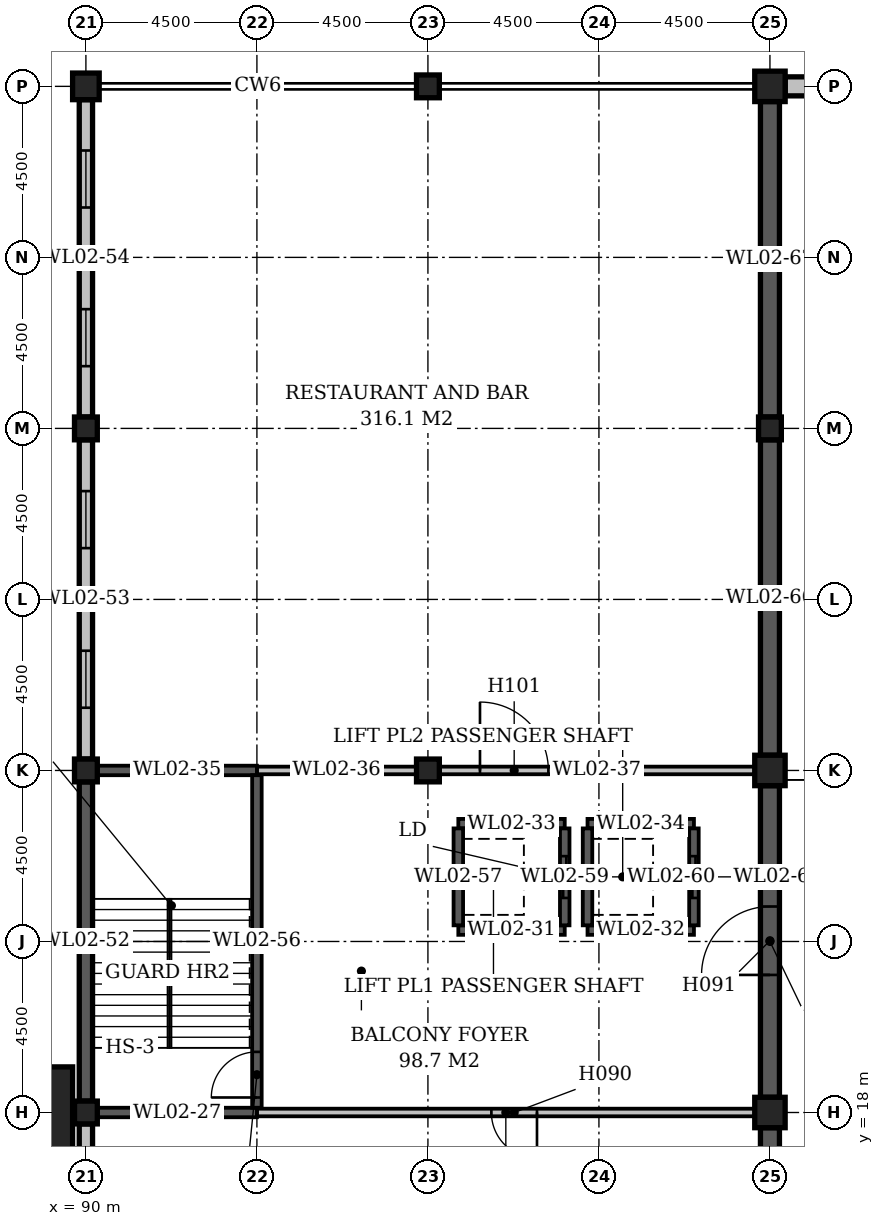
"""IFC4 building model, lengths in metres.
Left out: names, types, materials, properties, quantities, classifications, styles, units other than length and angle.
Written with IfcOpenShell. Run it as: python <this file> out.ifc"""

import sys

from ifc_helpers import new_model, si_unit, direction, frame, frame_2d, origin, origin_2d, place, context, subcontext, project, spatial, rectangle, extrude, element, fill, save


model = new_model("IFC4")
c1 = context("Model", 3, precision=1e-05, world=origin(), true_north=direction((0.0, 1.0)))
c2 = subcontext(c1, "Body", "Model", "MODEL_VIEW")
j1 = project(units=[si_unit("LENGTHUNIT", "METRE"), si_unit("PLANEANGLEUNIT", "RADIAN")], contexts=[c1])
p1 = place(None, origin())
s1 = spatial("IfcSite", under=j1, at=p1, CompositionType="ELEMENT")
p2 = place(p1, origin())
s2 = spatial("IfcBuilding", under=s1, at=p2, CompositionType="ELEMENT")
p3 = place(p2, frame((0.0, 0.0, 14.0)))
s3 = spatial("IfcBuildingStorey", under=s2, at=p3, CompositionType="ELEMENT", Elevation=14.0)
for number, where, z_axis, x_axis in (
    (1, (90.0, 18.0, 0.0), (0.0, 0.0, 1.0), (1.0, 0.0, 0.0)),
    (2, (90.0, 27.0, 0.0), (0.0, 0.0, 1.0), (1.0, 0.0, 0.0)),
    (3, (90.0, 36.0, 0.0), (0.0, 0.0, 1.0), (1.0, 0.0, 0.0)),
):
    element("IfcColumn", number, at=place(p3, frame(where, z_axis=z_axis, x_axis=x_axis)), inside=s3, PredefinedType="COLUMN", context=c2, shape_type="SweptSolid", body=[
        extrude(rectangle(XDim=0.6, YDim=0.6, at=origin_2d()), origin(), (0.0, 0.0, 1.0), 4.7),
    ])
p4 = place(p3, frame((90.0, 45.0, 0.0), z_axis=(0.0, 0.0, 1.0), x_axis=(1.0, 0.0, 0.0)))
e4 = element("IfcColumn", 4, at=p4, inside=s3, PredefinedType="COLUMN", context=c2, shape_type="SweptSolid", body=[
    extrude(rectangle(XDim=0.7, YDim=0.7, at=origin_2d()), origin(), (0.0, 0.0, 1.0), 4.7),
])
for number, where, z_axis, x_axis in (
    (5, (99.0, 27.0, 0.0), (0.0, 0.0, 1.0), (1.0, 0.0, 0.0)),
    (6, (99.0, 45.0, 0.0), (0.0, 0.0, 1.0), (1.0, 0.0, 0.0)),
):
    element("IfcColumn", number, at=place(p3, frame(where, z_axis=z_axis, x_axis=x_axis)), inside=s3, PredefinedType="COLUMN", context=c2, shape_type="SweptSolid", body=[
        extrude(rectangle(XDim=0.6, YDim=0.6, at=origin_2d()), origin(), (0.0, 0.0, 1.0), 4.7),
    ])
for number, where, z_axis, x_axis in (
    (7, (108.0, 18.0, -0.3), (0.0, 0.0, 1.0), (1.0, 0.0, 0.0)),
    (8, (108.0, 27.0, -0.3), (0.0, 0.0, 1.0), (1.0, 0.0, 0.0)),
):
    element("IfcColumn", number, at=place(p3, frame(where, z_axis=z_axis, x_axis=x_axis)), inside=s3, PredefinedType="COLUMN", context=c2, shape_type="SweptSolid", body=[
        extrude(rectangle(XDim=0.8, YDim=0.8, at=origin_2d()), origin(), (0.0, 0.0, 1.0), 5.0),
    ])
p5 = place(p3, frame((108.0, 36.0, -0.3), z_axis=(0.0, 0.0, 1.0), x_axis=(1.0, 0.0, 0.0)))
e9 = element("IfcColumn", 9, at=p5, inside=s3, PredefinedType="COLUMN", context=c2, shape_type="SweptSolid", body=[
    extrude(rectangle(XDim=0.6, YDim=0.6, at=origin_2d()), origin(), (0.0, 0.0, 1.0), 5.0),
])
p6 = place(p3, frame((108.0, 45.0, -0.3), z_axis=(0.0, 0.0, 1.0), x_axis=(1.0, 0.0, 0.0)))
e10 = element("IfcColumn", 10, at=p6, inside=s3, PredefinedType="COLUMN", context=c2, shape_type="SweptSolid", body=[
    extrude(rectangle(XDim=0.8, YDim=0.8, at=origin_2d()), origin(), (0.0, 0.0, 1.0), 5.0),
])
p7 = place(p3, frame((90.3, 18.0, 0.0), z_axis=(0.0, 0.0, 1.0), x_axis=(1.0, 0.0, 0.0)))
e11 = element("IfcWall", 11, at=p7, inside=s3, PredefinedType="STANDARD", context=c2, shape_type="SweptSolid", body=[
    extrude(rectangle(XDim=4.2, YDim=0.25, at=frame_2d((2.1, 0.0))), origin(), (0.0, 0.0, 1.0), 5.0),
])
p8 = place(p3, frame((94.5, 18.0, 0.0), z_axis=(0.0, 0.0, 1.0), x_axis=(1.0, 0.0, 0.0)))
e12 = element("IfcWall", 12, at=p8, inside=s3, PredefinedType="STANDARD", context=c2, shape_type="SweptSolid", body=[
    extrude(rectangle(XDim=13.1, YDim=0.2, at=frame_2d((6.55, 0.0))), origin(), (0.0, 0.0, 1.0), 3.3),
])
p9 = place(p8, frame((6.17, 0.0, 0.0)))
e13 = element("IfcOpeningElement", 13, at=p9, cuts=e12, PredefinedType="OPENING", context=c2, shape_type="SweptSolid", body=[
    extrude(rectangle(XDim=1.2, YDim=2.1, at=frame_2d((0.6, 1.05))), frame((0.0, 0.112, 0.0), z_axis=(0.0, -1.0, 0.0), x_axis=(1.0, 0.0, 0.0)), (0.0, 0.0, 1.0), 0.224),
])
for number, where, z_axis, x_axis in (
    (14, (99.8, 22.8, 0.0), (0.0, 0.0, 1.0), (1.0, 0.0, 0.0)),
    (15, (103.2, 22.8, 0.0), (0.0, 0.0, 1.0), (1.0, 0.0, 0.0)),
    (16, (99.8, 25.6, 0.0), (0.0, 0.0, 1.0), (1.0, 0.0, 0.0)),
    (17, (103.2, 25.6, 0.0), (0.0, 0.0, 1.0), (1.0, 0.0, 0.0)),
):
    element("IfcWall", number, at=place(p3, frame(where, z_axis=z_axis, x_axis=x_axis)), inside=s3, PredefinedType="STANDARD", context=c2, shape_type="SweptSolid", body=[
        extrude(rectangle(XDim=2.8, YDim=0.25, at=frame_2d((1.4, 0.0))), origin(), (0.0, 0.0, 1.0), 5.0),
    ])
p10 = place(p3, frame((90.3, 27.0, 0.0), z_axis=(0.0, 0.0, 1.0), x_axis=(1.0, 0.0, 0.0)))
e18 = element("IfcWall", 18, at=p10, inside=s3, PredefinedType="STANDARD", context=c2, shape_type="SweptSolid", body=[
    extrude(rectangle(XDim=4.2, YDim=0.25, at=frame_2d((2.1, 0.0))), origin(), (0.0, 0.0, 1.0), 5.0),
])
p11 = place(p3, frame((94.5, 27.0, 0.0), z_axis=(0.0, 0.0, 1.0), x_axis=(1.0, 0.0, 0.0)))
e19 = element("IfcWall", 19, at=p11, inside=s3, PredefinedType="STANDARD", context=c2, shape_type="SweptSolid", body=[
    extrude(rectangle(XDim=4.2, YDim=0.2, at=frame_2d((2.1, 0.0))), origin(), (0.0, 0.0, 1.0), 4.7),
])
p12 = place(p3, frame((99.3, 27.0, 0.0), z_axis=(0.0, 0.0, 1.0), x_axis=(1.0, 0.0, 0.0)))
e20 = element("IfcWall", 20, at=p12, inside=s3, PredefinedType="STANDARD", context=c2, shape_type="SweptSolid", body=[
    extrude(rectangle(XDim=8.3, YDim=0.2, at=frame_2d((4.15, 0.0))), origin(), (0.0, 0.0, 1.0), 4.7),
])
p13 = place(p12, frame((1.07, 0.0, 0.0)))
e21 = element("IfcOpeningElement", 21, at=p13, cuts=e20, PredefinedType="OPENING", context=c2, shape_type="SweptSolid", body=[
    extrude(rectangle(XDim=1.8, YDim=2.4, at=frame_2d((0.9, 1.2))), frame((0.0, 0.112, 0.0), z_axis=(0.0, -1.0, 0.0), x_axis=(1.0, 0.0, 0.0)), (0.0, 0.0, 1.0), 0.224),
])
p14 = place(p3, frame((108.4, 45.0, 0.0), z_axis=(0.0, 0.0, 1.0), x_axis=(1.0, 0.0, 0.0)))
e22 = element("IfcWall", 22, at=p14, inside=s3, PredefinedType="STANDARD", context=c2, shape_type="SweptSolid", body=[
    extrude(rectangle(XDim=8.3, YDim=0.5, at=frame_2d((4.15, 0.0))), origin(), (0.0, 0.0, 1.0), 5.0),
])
p15 = place(p3, frame((90.0, 9.3, 0.0), z_axis=(0.0, 0.0, 1.0), x_axis=(0.0, 1.0, 0.0)))
e23 = element("IfcWall", 23, at=p15, inside=s3, PredefinedType="STANDARD", context=c2, shape_type="SweptSolid", body=[
    extrude(rectangle(XDim=8.4, YDim=0.35, at=frame_2d((4.2, 0.0))), origin(), (0.0, 0.0, 1.0), 4.1),
])
p16 = place(p15, frame((1.35, 0.0, 1.0)))
e24 = element("IfcOpeningElement", 24, at=p16, cuts=e23, PredefinedType="OPENING", context=c2, shape_type="SweptSolid", body=[
    extrude(rectangle(XDim=1.5, YDim=2.4, at=frame_2d((0.75, 1.2))), frame((0.0, 0.187, 0.0), z_axis=(0.0, -1.0, 0.0), x_axis=(1.0, 0.0, 0.0)), (0.0, 0.0, 1.0), 0.374),
])
p17 = place(p15, frame((5.55, 0.0, 1.0)))
e25 = element("IfcOpeningElement", 25, at=p17, cuts=e23, PredefinedType="OPENING", context=c2, shape_type="SweptSolid", body=[
    extrude(rectangle(XDim=1.5, YDim=2.4, at=frame_2d((0.75, 1.2))), frame((0.0, 0.187, 0.0), z_axis=(0.0, -1.0, 0.0), x_axis=(1.0, 0.0, 0.0)), (0.0, 0.0, 1.0), 0.374),
])
p18 = place(p3, frame((90.0, 18.3, 0.0), z_axis=(0.0, 0.0, 1.0), x_axis=(0.0, 1.0, 0.0)))
e26 = element("IfcWall", 26, at=p18, inside=s3, PredefinedType="STANDARD", context=c2, shape_type="SweptSolid", body=[
    extrude(rectangle(XDim=8.4, YDim=0.35, at=frame_2d((4.2, 0.0))), origin(), (0.0, 0.0, 1.0), 5.0),
])
p19 = place(p3, frame((90.0, 27.3, 0.0), z_axis=(0.0, 0.0, 1.0), x_axis=(0.0, 1.0, 0.0)))
e27 = element("IfcWall", 27, at=p19, inside=s3, PredefinedType="STANDARD", context=c2, shape_type="SweptSolid", body=[
    extrude(rectangle(XDim=8.4, YDim=0.35, at=frame_2d((4.2, 0.0))), origin(), (0.0, 0.0, 1.0), 4.1),
])
p20 = place(p19, frame((1.35, 0.0, 1.0)))
e28 = element("IfcOpeningElement", 28, at=p20, cuts=e27, PredefinedType="OPENING", context=c2, shape_type="SweptSolid", body=[
    extrude(rectangle(XDim=1.5, YDim=2.4, at=frame_2d((0.75, 1.2))), frame((0.0, 0.187, 0.0), z_axis=(0.0, -1.0, 0.0), x_axis=(1.0, 0.0, 0.0)), (0.0, 0.0, 1.0), 0.374),
])
p21 = place(p19, frame((5.55, 0.0, 1.0)))
e29 = element("IfcOpeningElement", 29, at=p21, cuts=e27, PredefinedType="OPENING", context=c2, shape_type="SweptSolid", body=[
    extrude(rectangle(XDim=1.5, YDim=2.4, at=frame_2d((0.75, 1.2))), frame((0.0, 0.187, 0.0), z_axis=(0.0, -1.0, 0.0), x_axis=(1.0, 0.0, 0.0)), (0.0, 0.0, 1.0), 0.374),
])
p22 = place(p3, frame((90.0, 36.3, 0.0), z_axis=(0.0, 0.0, 1.0), x_axis=(0.0, 1.0, 0.0)))
e30 = element("IfcWall", 30, at=p22, inside=s3, PredefinedType="STANDARD", context=c2, shape_type="SweptSolid", body=[
    extrude(rectangle(XDim=8.35, YDim=0.35, at=frame_2d((4.175, 0.0))), origin(), (0.0, 0.0, 1.0), 4.1),
])
p23 = place(p22, frame((1.337, 0.0, 1.0)))
e31 = element("IfcOpeningElement", 31, at=p23, cuts=e30, PredefinedType="OPENING", context=c2, shape_type="SweptSolid", body=[
    extrude(rectangle(XDim=1.5, YDim=2.4, at=frame_2d((0.75, 1.2))), frame((0.0, 0.187, 0.0), z_axis=(0.0, -1.0, 0.0), x_axis=(1.0, 0.0, 0.0)), (0.0, 0.0, 1.0), 0.374),
])
p24 = place(p22, frame((5.512, 0.0, 1.0)))
e32 = element("IfcOpeningElement", 32, at=p24, cuts=e30, PredefinedType="OPENING", context=c2, shape_type="SweptSolid", body=[
    extrude(rectangle(XDim=1.5, YDim=2.4, at=frame_2d((0.75, 1.2))), frame((0.0, 0.187, 0.0), z_axis=(0.0, -1.0, 0.0), x_axis=(1.0, 0.0, 0.0)), (0.0, 0.0, 1.0), 0.374),
])
p25 = place(p3, frame((94.5, 18.125, 0.0), z_axis=(0.0, 0.0, 1.0), x_axis=(0.0, 1.0, 0.0)))
e33 = element("IfcWall", 33, at=p25, inside=s3, PredefinedType="STANDARD", context=c2, shape_type="SweptSolid", body=[
    extrude(rectangle(XDim=8.75, YDim=0.25, at=frame_2d((4.375, 0.0))), origin(), (0.0, 0.0, 1.0), 5.0),
])
p26 = place(p25, frame((0.27, 0.0, 0.0)))
e34 = element("IfcOpeningElement", 34, at=p26, cuts=e33, PredefinedType="OPENING", context=c2, shape_type="SweptSolid", body=[
    extrude(rectangle(XDim=1.2, YDim=2.1, at=frame_2d((0.6, 1.05))), frame((0.0, 0.137, 0.0), z_axis=(0.0, -1.0, 0.0), x_axis=(1.0, 0.0, 0.0)), (0.0, 0.0, 1.0), 0.274),
])
p27 = place(p3, frame((99.8, 22.925, 0.0), z_axis=(0.0, 0.0, 1.0), x_axis=(0.0, 1.0, 0.0)))
e35 = element("IfcWall", 35, at=p27, inside=s3, PredefinedType="STANDARD", context=c2, shape_type="SweptSolid", body=[
    extrude(rectangle(XDim=2.55, YDim=0.25, at=frame_2d((1.275, 0.0))), origin(), (0.0, 0.0, 1.0), 5.0),
])
p28 = place(p3, frame((102.6, 22.925, 0.0), z_axis=(0.0, 0.0, 1.0), x_axis=(0.0, 1.0, 0.0)))
e36 = element("IfcWall", 36, at=p28, inside=s3, PredefinedType="STANDARD", context=c2, shape_type="SweptSolid", body=[
    extrude(rectangle(XDim=2.55, YDim=0.25, at=frame_2d((1.275, 0.0))), origin(), (0.0, 0.0, 1.0), 5.0),
])
p29 = place(p28, frame((0.72, 0.0, 0.0)))
e37 = element("IfcOpeningElement", 37, at=p29, cuts=e36, PredefinedType="OPENING", context=c2, shape_type="SweptSolid", body=[
    extrude(rectangle(XDim=1.1, YDim=2.1, at=frame_2d((0.55, 1.05))), frame((0.0, 0.137, 0.0), z_axis=(0.0, -1.0, 0.0), x_axis=(1.0, 0.0, 0.0)), (0.0, 0.0, 1.0), 0.274),
])
p30 = place(p3, frame((103.2, 22.925, 0.0), z_axis=(0.0, 0.0, 1.0), x_axis=(0.0, 1.0, 0.0)))
e38 = element("IfcWall", 38, at=p30, inside=s3, PredefinedType="STANDARD", context=c2, shape_type="SweptSolid", body=[
    extrude(rectangle(XDim=2.55, YDim=0.25, at=frame_2d((1.275, 0.0))), origin(), (0.0, 0.0, 1.0), 5.0),
])
p31 = place(p3, frame((106.0, 22.925, 0.0), z_axis=(0.0, 0.0, 1.0), x_axis=(0.0, 1.0, 0.0)))
e39 = element("IfcWall", 39, at=p31, inside=s3, PredefinedType="STANDARD", context=c2, shape_type="SweptSolid", body=[
    extrude(rectangle(XDim=2.55, YDim=0.25, at=frame_2d((1.275, 0.0))), origin(), (0.0, 0.0, 1.0), 5.0),
])
p32 = place(p31, frame((0.72, 0.0, 0.0)))
e40 = element("IfcOpeningElement", 40, at=p32, cuts=e39, PredefinedType="OPENING", context=c2, shape_type="SweptSolid", body=[
    extrude(rectangle(XDim=1.1, YDim=2.1, at=frame_2d((0.55, 1.05))), frame((0.0, 0.137, 0.0), z_axis=(0.0, -1.0, 0.0), x_axis=(1.0, 0.0, 0.0)), (0.0, 0.0, 1.0), 0.274),
])
p33 = place(p3, frame((108.0, 9.4, 0.0), z_axis=(0.0, 0.0, 1.0), x_axis=(0.0, 1.0, 0.0)))
e41 = element("IfcWall", 41, at=p33, inside=s3, PredefinedType="STANDARD", context=c2, shape_type="SweptSolid", body=[
    extrude(rectangle(XDim=8.2, YDim=0.5, at=frame_2d((4.1, 0.0))), origin(), (0.0, 0.0, 1.0), 5.0),
])
p34 = place(p3, frame((108.0, 18.4, 0.0), z_axis=(0.0, 0.0, 1.0), x_axis=(0.0, 1.0, 0.0)))
e42 = element("IfcWall", 42, at=p34, inside=s3, PredefinedType="STANDARD", context=c2, shape_type="SweptSolid", body=[
    extrude(rectangle(XDim=8.2, YDim=0.5, at=frame_2d((4.1, 0.0))), origin(), (0.0, 0.0, 1.0), 5.0),
])
p35 = place(p34, frame((3.22, 0.0, 0.0)))
e43 = element("IfcOpeningElement", 43, at=p35, cuts=e42, PredefinedType="OPENING", context=c2, shape_type="SweptSolid", body=[
    extrude(rectangle(XDim=1.8, YDim=2.4, at=frame_2d((0.9, 1.2))), frame((0.0, 0.262, 0.0), z_axis=(0.0, -1.0, 0.0), x_axis=(1.0, 0.0, 0.0)), (0.0, 0.0, 1.0), 0.524),
])
for number, where, z_axis, x_axis in (
    (44, (108.0, 27.4, 0.0), (0.0, 0.0, 1.0), (0.0, 1.0, 0.0)),
    (45, (108.0, 36.3, 0.0), (0.0, 0.0, 1.0), (0.0, 1.0, 0.0)),
):
    element("IfcWall", number, at=place(p3, frame(where, z_axis=z_axis, x_axis=x_axis)), inside=s3, PredefinedType="STANDARD", context=c2, shape_type="SweptSolid", body=[
        extrude(rectangle(XDim=8.3, YDim=0.5, at=frame_2d((4.15, 0.0))), origin(), (0.0, 0.0, 1.0), 5.0),
    ])
p36 = place(p3, frame((88.85, 18.0, 0.0), z_axis=(0.0, 0.0, 1.0), x_axis=(1.0, 0.0, 0.0)))
e46 = element("IfcColumn", 46, at=p36, inside=s3, PredefinedType="COLUMN", context=c2, shape_type="SweptSolid", body=[
    extrude(rectangle(XDim=1.6, YDim=2.4, at=origin_2d()), origin(), (0.0, 0.0, 1.0), 5.0),
])
p37 = place(p9, origin())
e47 = element("IfcDoor", 47, at=p37, inside=s3, OperationType="SINGLE_SWING_RIGHT", PredefinedType="DOOR", context=c2, shape_type="SweptSolid", body=[
    extrude(rectangle(XDim=1.2, YDim=2.1, at=frame_2d((0.6, 1.05))), frame((0.0, 0.025, 0.0), z_axis=(0.0, -1.0, 0.0), x_axis=(1.0, 0.0, 0.0)), (0.0, 0.0, 1.0), 0.05),
])
fill(e13, e47)
p38 = place(p35, origin())
e48 = element("IfcDoor", 48, at=p38, inside=s3, OperationType="DOUBLE_DOOR_SINGLE_SWING", PredefinedType="DOOR", context=c2, shape_type="SweptSolid", body=[
    extrude(rectangle(XDim=1.8, YDim=2.4, at=frame_2d((0.9, 1.2))), frame((0.0, 0.025, 0.0), z_axis=(0.0, -1.0, 0.0), x_axis=(1.0, 0.0, 0.0)), (0.0, 0.0, 1.0), 0.05),
])
fill(e43, e48)
p39 = place(p26, origin())
e49 = element("IfcDoor", 49, at=p39, inside=s3, OperationType="SINGLE_SWING_LEFT", PredefinedType="DOOR", context=c2, shape_type="SweptSolid", body=[
    extrude(rectangle(XDim=1.2, YDim=2.1, at=frame_2d((0.6, 1.05))), frame((0.0, 0.025, 0.0), z_axis=(0.0, -1.0, 0.0), x_axis=(1.0, 0.0, 0.0)), (0.0, 0.0, 1.0), 0.05),
])
fill(e34, e49)
p40 = place(p13, origin())
e50 = element("IfcDoor", 50, at=p40, inside=s3, OperationType="DOUBLE_DOOR_SINGLE_SWING", PredefinedType="DOOR", context=c2, shape_type="SweptSolid", body=[
    extrude(rectangle(XDim=1.8, YDim=2.4, at=frame_2d((0.9, 1.2))), frame((0.0, 0.025, 0.0), z_axis=(0.0, -1.0, 0.0), x_axis=(1.0, 0.0, 0.0)), (0.0, 0.0, 1.0), 0.05),
])
fill(e21, e50)
p41 = place(p29, origin())
e51 = element("IfcDoor", 51, at=p41, inside=s3, OperationType="SLIDING_TO_LEFT", PredefinedType="DOOR", context=c2, shape_type="SweptSolid", body=[
    extrude(rectangle(XDim=1.1, YDim=2.1, at=frame_2d((0.55, 1.05))), frame((0.0, 0.025, 0.0), z_axis=(0.0, -1.0, 0.0), x_axis=(1.0, 0.0, 0.0)), (0.0, 0.0, 1.0), 0.05),
])
fill(e37, e51)
p42 = place(p32, origin())
e52 = element("IfcDoor", 52, at=p42, inside=s3, OperationType="SLIDING_TO_LEFT", PredefinedType="DOOR", context=c2, shape_type="SweptSolid", body=[
    extrude(rectangle(XDim=1.1, YDim=2.1, at=frame_2d((0.55, 1.05))), frame((0.0, 0.025, 0.0), z_axis=(0.0, -1.0, 0.0), x_axis=(1.0, 0.0, 0.0)), (0.0, 0.0, 1.0), 0.05),
])
fill(e40, e52)
p43 = place(p20, origin())
e53 = element("IfcWindow", 53, at=p43, inside=s3, PartitioningType="SINGLE_PANEL", PredefinedType="WINDOW", context=c2, shape_type="SweptSolid", body=[
    extrude(rectangle(XDim=1.5, YDim=2.4, at=frame_2d((0.75, 1.2))), frame((0.0, 0.03, 0.0), z_axis=(0.0, -1.0, 0.0), x_axis=(1.0, 0.0, 0.0)), (0.0, 0.0, 1.0), 0.06),
])
fill(e28, e53)
p44 = place(p21, origin())
e54 = element("IfcWindow", 54, at=p44, inside=s3, PartitioningType="SINGLE_PANEL", PredefinedType="WINDOW", context=c2, shape_type="SweptSolid", body=[
    extrude(rectangle(XDim=1.5, YDim=2.4, at=frame_2d((0.75, 1.2))), frame((0.0, 0.03, 0.0), z_axis=(0.0, -1.0, 0.0), x_axis=(1.0, 0.0, 0.0)), (0.0, 0.0, 1.0), 0.06),
])
fill(e29, e54)
p45 = place(p23, origin())
e55 = element("IfcWindow", 55, at=p45, inside=s3, PartitioningType="SINGLE_PANEL", PredefinedType="WINDOW", context=c2, shape_type="SweptSolid", body=[
    extrude(rectangle(XDim=1.5, YDim=2.4, at=frame_2d((0.75, 1.2))), frame((0.0, 0.03, 0.0), z_axis=(0.0, -1.0, 0.0), x_axis=(1.0, 0.0, 0.0)), (0.0, 0.0, 1.0), 0.06),
])
fill(e31, e55)
p46 = place(p24, origin())
e56 = element("IfcWindow", 56, at=p46, inside=s3, PartitioningType="SINGLE_PANEL", PredefinedType="WINDOW", context=c2, shape_type="SweptSolid", body=[
    extrude(rectangle(XDim=1.5, YDim=2.4, at=frame_2d((0.75, 1.2))), frame((0.0, 0.03, 0.0), z_axis=(0.0, -1.0, 0.0), x_axis=(1.0, 0.0, 0.0)), (0.0, 0.0, 1.0), 0.06),
])
fill(e32, e56)
save(model, sys.argv[1])
